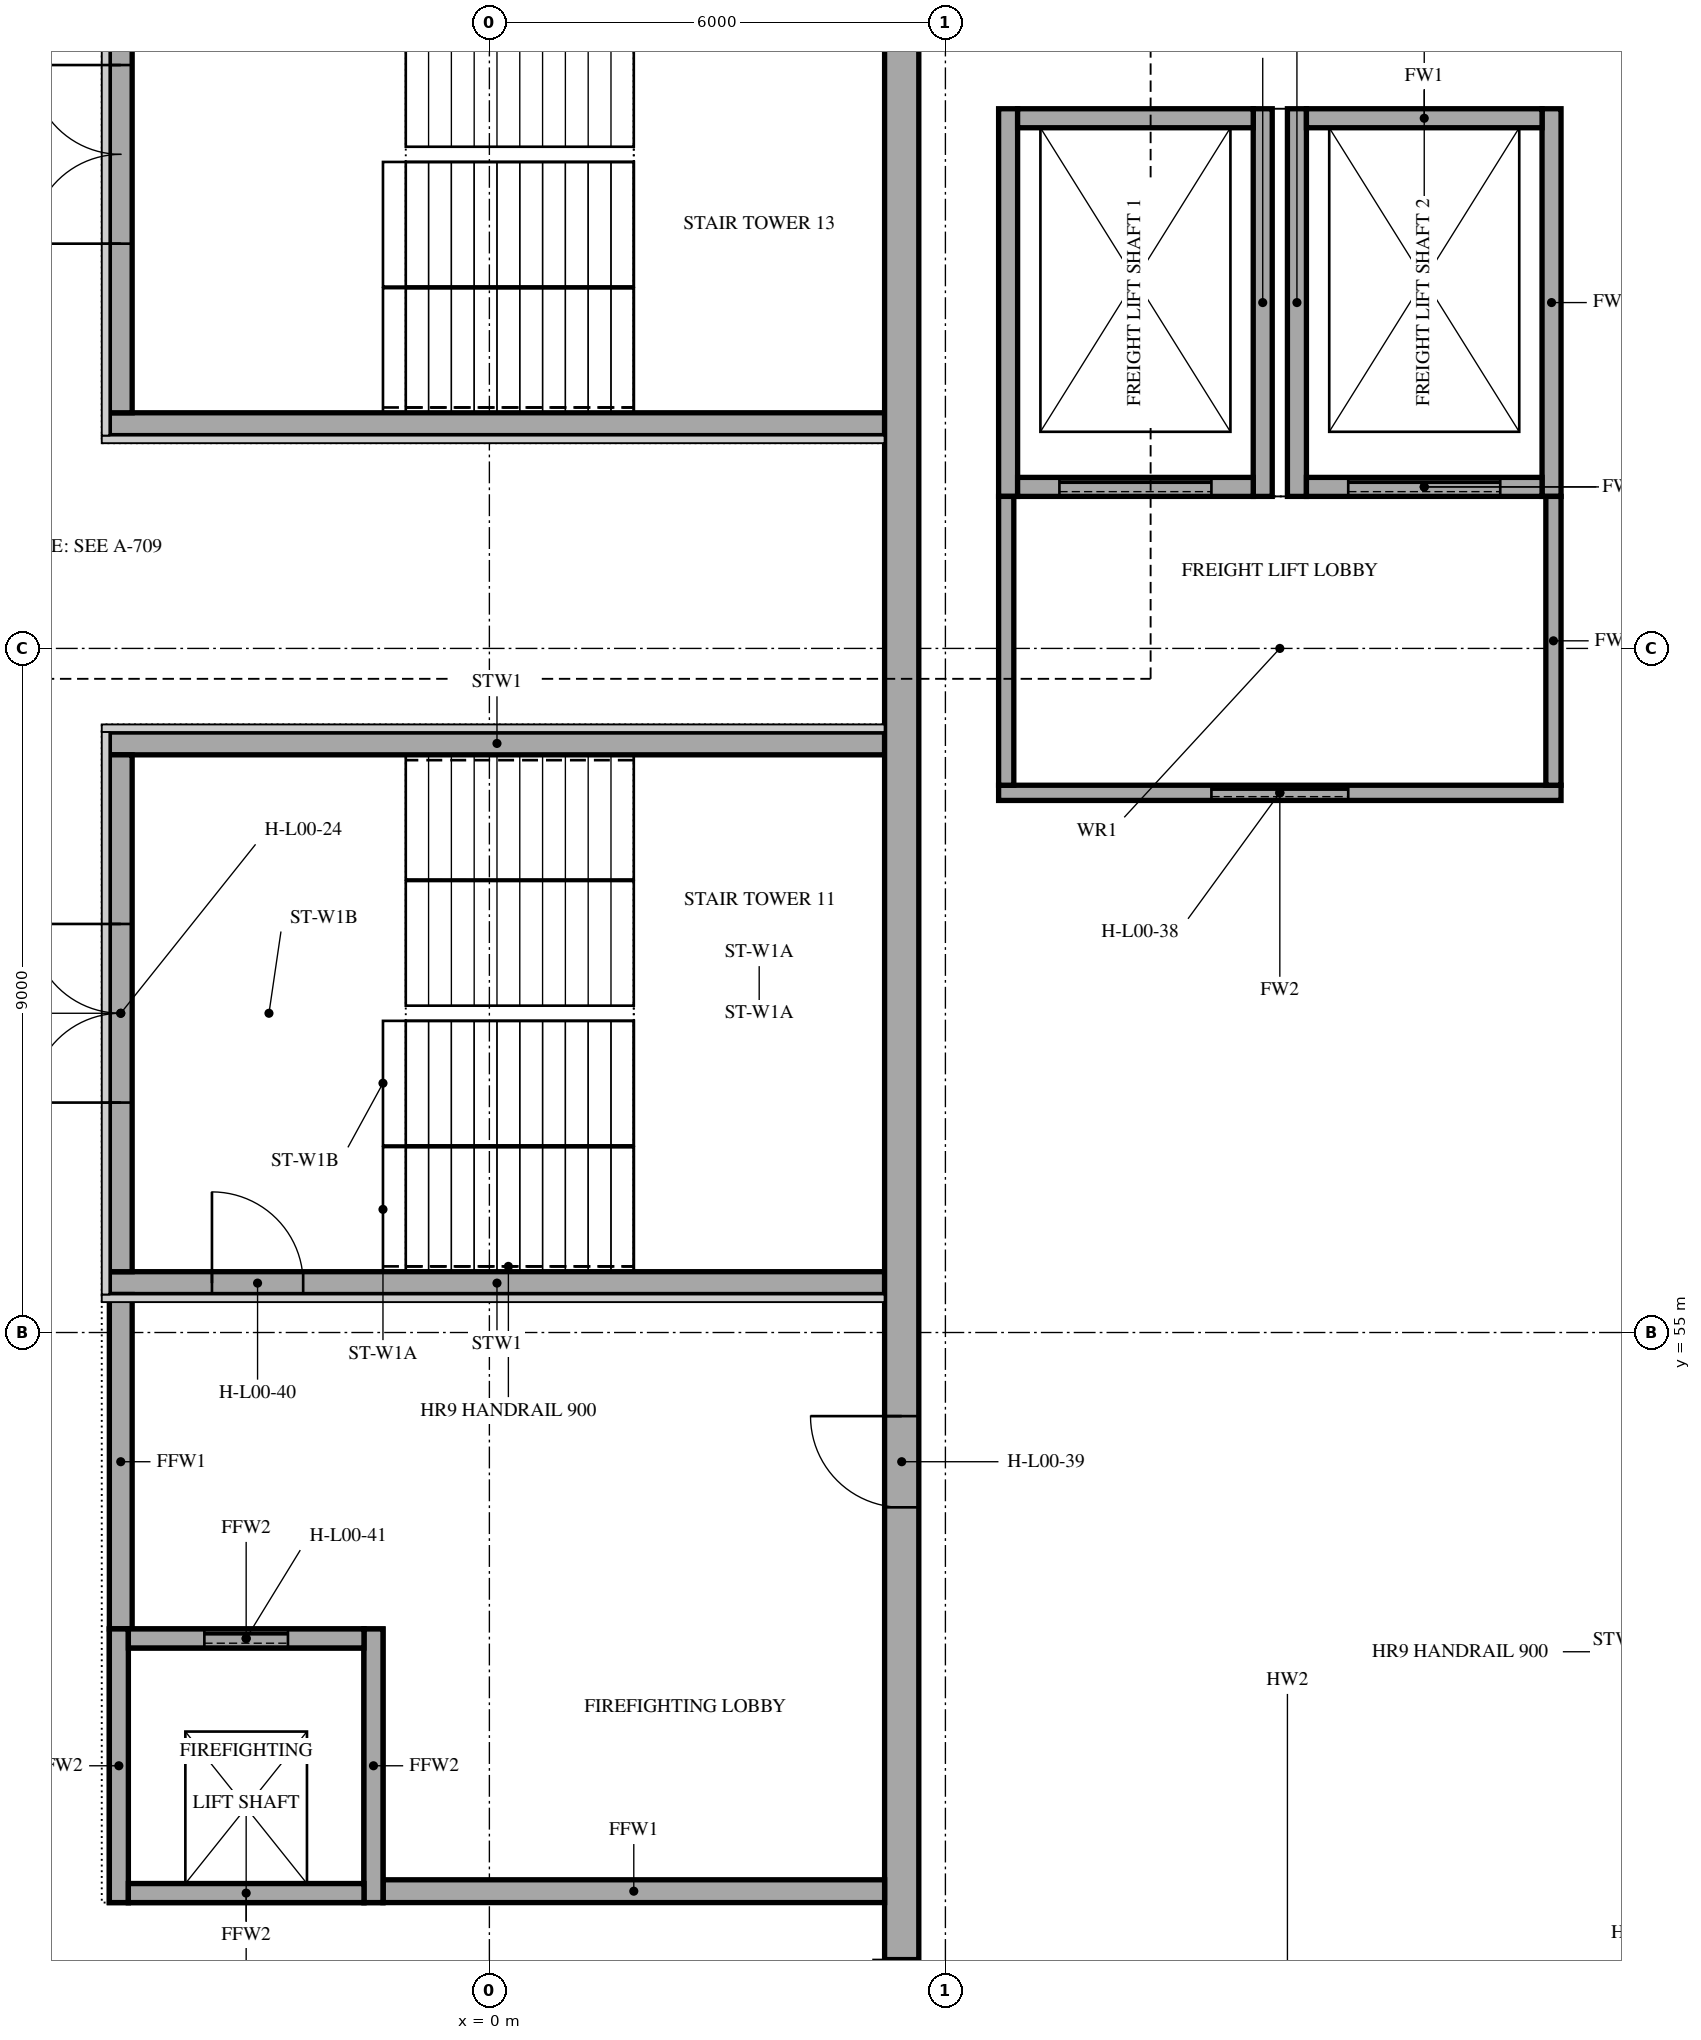
"""IFC4 building model, lengths in metres.
Left out: names, types, materials, properties, quantities, classifications, styles, units other than length and angle.
Written with IfcOpenShell. Run it as: python <this file> out.ifc"""

import sys

from ifc_helpers import new_model, si_unit, direction, frame, frame_2d, origin, place, context, subcontext, project, spatial, rectangle, extrude, element, fill, save


model = new_model("IFC4")
c1 = context("Model", 3, precision=1e-05, world=origin(), true_north=direction((0.0, 1.0)))
c2 = subcontext(c1, "Body", "Model", "MODEL_VIEW")
j1 = project(units=[si_unit("LENGTHUNIT", "METRE"), si_unit("PLANEANGLEUNIT", "RADIAN")], contexts=[c1])
p1 = place(None, origin())
s1 = spatial("IfcSite", under=j1, at=p1, CompositionType="ELEMENT")
p2 = place(p1, origin())
s2 = spatial("IfcBuilding", under=s1, at=p2, CompositionType="ELEMENT")
p3 = place(p2, origin())
s3 = spatial("IfcBuildingStorey", under=s2, at=p3, CompositionType="ELEMENT", Elevation=0.0)
p4 = place(p3, frame((5.2, 55.65, 0.0), z_axis=(0.0, 0.0, 1.0), x_axis=(-1.0, 0.0, 0.0)))
e1 = element("IfcWall", 1, at=p4, inside=s3, PredefinedType="SHEAR", context=c2, shape_type="SweptSolid", body=[
    extrude(rectangle(XDim=10.2, YDim=0.3, at=frame_2d((5.1, 0.0))), origin(), (0.0, 0.0, 1.0), 5.0),
])
p5 = place(p4, frame((7.65, 0.0, 0.0)))
e2 = element("IfcOpeningElement", 2, at=p5, cuts=e1, PredefinedType="OPENING", context=c2, shape_type="SweptSolid", body=[
    extrude(rectangle(XDim=1.2, YDim=2.1, at=frame_2d((0.6, 1.05))), frame((0.0, 0.16, 0.0), z_axis=(0.0, -1.0, 0.0), x_axis=(1.0, 0.0, 0.0)), (0.0, 0.0, 1.0), 0.32),
])
p6 = place(p3, frame((5.2, 62.75, 0.0), z_axis=(0.0, 0.0, 1.0), x_axis=(-1.0, 0.0, 0.0)))
e3 = element("IfcWall", 3, at=p6, inside=s3, PredefinedType="SHEAR", context=c2, shape_type="SweptSolid", body=[
    extrude(rectangle(XDim=10.2, YDim=0.3, at=frame_2d((5.1, 0.0))), origin(), (0.0, 0.0, 1.0), 5.0),
])
p7 = place(p3, frame((-4.85, 55.8, 0.0), z_axis=(0.0, 0.0, 1.0), x_axis=(0.0, 1.0, 0.0)))
e4 = element("IfcWall", 4, at=p7, inside=s3, PredefinedType="SHEAR", context=c2, shape_type="SweptSolid", body=[
    extrude(rectangle(XDim=6.8, YDim=0.3, at=frame_2d((3.4, 0.0))), origin(), (0.0, 0.0, 1.0), 5.0),
])
p8 = place(p7, frame((2.225, 0.0, 0.0)))
e5 = element("IfcOpeningElement", 5, at=p8, cuts=e4, PredefinedType="OPENING", context=c2, shape_type="SweptSolid", body=[
    extrude(rectangle(XDim=2.35, YDim=2.1, at=frame_2d((1.175, 1.05))), frame((0.0, 0.16, 0.0), z_axis=(0.0, -1.0, 0.0), x_axis=(1.0, 0.0, 0.0)), (0.0, 0.0, 1.0), 0.32),
])
p9 = place(p3, frame((5.2, 66.95, 0.0), z_axis=(0.0, 0.0, 1.0), x_axis=(-1.0, 0.0, 0.0)))
e6 = element("IfcWall", 6, at=p9, inside=s3, PredefinedType="SHEAR", context=c2, shape_type="SweptSolid", body=[
    extrude(rectangle(XDim=10.2, YDim=0.3, at=frame_2d((5.1, 0.0))), origin(), (0.0, 0.0, 1.0), 5.0),
])
p10 = place(p3, frame((-4.85, 67.1, 0.0), z_axis=(0.0, 0.0, 1.0), x_axis=(0.0, 1.0, 0.0)))
e7 = element("IfcWall", 7, at=p10, inside=s3, PredefinedType="SHEAR", context=c2, shape_type="SweptSolid", body=[
    extrude(rectangle(XDim=6.8, YDim=0.3, at=frame_2d((3.4, 0.0))), origin(), (0.0, 0.0, 1.0), 5.0),
])
p11 = place(p10, frame((2.225, 0.0, 0.0)))
e8 = element("IfcOpeningElement", 8, at=p11, cuts=e7, PredefinedType="OPENING", context=c2, shape_type="SweptSolid", body=[
    extrude(rectangle(XDim=2.35, YDim=2.1, at=frame_2d((1.175, 1.05))), frame((0.0, 0.16, 0.0), z_axis=(0.0, -1.0, 0.0), x_axis=(1.0, 0.0, 0.0)), (0.0, 0.0, 1.0), 0.32),
])
p12 = place(p3, frame((5.425, 46.75, 0.0), z_axis=(0.0, 0.0, 1.0), x_axis=(0.0, 1.0, 0.0)))
e9 = element("IfcWall", 9, at=p12, inside=s3, PredefinedType="SOLIDWALL", context=c2, shape_type="SweptSolid", body=[
    extrude(rectangle(XDim=61.65, YDim=0.45, at=frame_2d((30.825, 0.0))), origin(), (0.0, 0.0, 1.0), 5.0),
])
p13 = place(p12, frame((5.95, 0.0, 0.0)))
e10 = element("IfcOpeningElement", 10, at=p13, cuts=e9, PredefinedType="OPENING", context=c2, shape_type="SweptSolid", body=[
    extrude(rectangle(XDim=1.2, YDim=2.1, at=frame_2d((0.6, 1.05))), frame((0.0, 0.235, 0.0), z_axis=(0.0, -1.0, 0.0), x_axis=(1.0, 0.0, 0.0)), (0.0, 0.0, 1.0), 0.47),
])
for number, where, z_axis, x_axis in (
    (11, (6.825, 66.0, 0.0), (0.0, 0.0, 1.0), (0.0, 1.0, 0.0)),
    (12, (10.175, 66.0, 0.0), (0.0, 0.0, 1.0), (0.0, 1.0, 0.0)),
):
    element("IfcWall", number, at=place(p3, frame(where, z_axis=z_axis, x_axis=x_axis)), inside=s3, PredefinedType="SHEAR", context=c2, shape_type="SweptSolid", body=[
        extrude(rectangle(XDim=5.1, YDim=0.25, at=frame_2d((2.55, 0.0))), origin(), (0.0, 0.0, 1.0), 5.0),
    ])
p14 = place(p3, frame((6.95, 66.125, 0.0), z_axis=(0.0, 0.0, 1.0), x_axis=(1.0, 0.0, 0.0)))
e13 = element("IfcWall", 13, at=p14, inside=s3, PredefinedType="SHEAR", context=c2, shape_type="SweptSolid", body=[
    extrude(rectangle(XDim=3.1, YDim=0.25, at=frame_2d((1.55, 0.0))), origin(), (0.0, 0.0, 1.0), 5.0),
])
p15 = place(p14, frame((0.55, 0.0, 0.0)))
e14 = element("IfcOpeningElement", 14, at=p15, cuts=e13, PredefinedType="OPENING", context=c2, shape_type="SweptSolid", body=[
    extrude(rectangle(XDim=2.0, YDim=2.4, at=frame_2d((1.0, 1.2))), frame((0.0, 0.135, 0.0), z_axis=(0.0, -1.0, 0.0), x_axis=(1.0, 0.0, 0.0)), (0.0, 0.0, 1.0), 0.27),
])
p16 = place(p3, frame((6.95, 70.975, 0.0), z_axis=(0.0, 0.0, 1.0), x_axis=(1.0, 0.0, 0.0)))
e15 = element("IfcWall", 15, at=p16, inside=s3, PredefinedType="SHEAR", context=c2, shape_type="SweptSolid", body=[
    extrude(rectangle(XDim=3.1, YDim=0.25, at=frame_2d((1.55, 0.0))), origin(), (0.0, 0.0, 1.0), 5.0),
])
for number, where, z_axis, x_axis in (
    (16, (10.625, 66.0, 0.0), (0.0, 0.0, 1.0), (0.0, 1.0, 0.0)),
    (17, (13.975, 66.0, 0.0), (0.0, 0.0, 1.0), (0.0, 1.0, 0.0)),
):
    element("IfcWall", number, at=place(p3, frame(where, z_axis=z_axis, x_axis=x_axis)), inside=s3, PredefinedType="SHEAR", context=c2, shape_type="SweptSolid", body=[
        extrude(rectangle(XDim=5.1, YDim=0.25, at=frame_2d((2.55, 0.0))), origin(), (0.0, 0.0, 1.0), 5.0),
    ])
p17 = place(p3, frame((10.75, 66.125, 0.0), z_axis=(0.0, 0.0, 1.0), x_axis=(1.0, 0.0, 0.0)))
e18 = element("IfcWall", 18, at=p17, inside=s3, PredefinedType="SHEAR", context=c2, shape_type="SweptSolid", body=[
    extrude(rectangle(XDim=3.1, YDim=0.25, at=frame_2d((1.55, 0.0))), origin(), (0.0, 0.0, 1.0), 5.0),
])
p18 = place(p17, frame((0.55, 0.0, 0.0)))
e19 = element("IfcOpeningElement", 19, at=p18, cuts=e18, PredefinedType="OPENING", context=c2, shape_type="SweptSolid", body=[
    extrude(rectangle(XDim=2.0, YDim=2.4, at=frame_2d((1.0, 1.2))), frame((0.0, 0.135, 0.0), z_axis=(0.0, -1.0, 0.0), x_axis=(1.0, 0.0, 0.0)), (0.0, 0.0, 1.0), 0.27),
])
p19 = place(p3, frame((10.75, 70.975, 0.0), z_axis=(0.0, 0.0, 1.0), x_axis=(1.0, 0.0, 0.0)))
e20 = element("IfcWall", 20, at=p19, inside=s3, PredefinedType="SHEAR", context=c2, shape_type="SweptSolid", body=[
    extrude(rectangle(XDim=3.1, YDim=0.25, at=frame_2d((1.55, 0.0))), origin(), (0.0, 0.0, 1.0), 5.0),
])
p20 = place(p3, frame((6.7, 62.1, 0.0), z_axis=(0.0, 0.0, 1.0), x_axis=(1.0, 0.0, 0.0)))
e21 = element("IfcWall", 21, at=p20, inside=s3, PredefinedType="SOLIDWALL", context=c2, shape_type="SweptSolid", body=[
    extrude(rectangle(XDim=7.4, YDim=0.2, at=frame_2d((3.7, 0.0))), origin(), (0.0, 0.0, 1.0), 3.7),
])
p21 = place(p20, frame((2.8, 0.0, 0.0)))
e22 = element("IfcOpeningElement", 22, at=p21, cuts=e21, PredefinedType="OPENING", context=c2, shape_type="SweptSolid", body=[
    extrude(rectangle(XDim=1.8, YDim=2.1, at=frame_2d((0.9, 1.05))), frame((0.0, 0.11, 0.0), z_axis=(0.0, -1.0, 0.0), x_axis=(1.0, 0.0, 0.0)), (0.0, 0.0, 1.0), 0.22),
])
for number, where, z_axis, x_axis in (
    (23, (6.8, 62.2, 0.0), (0.0, 0.0, 1.0), (0.0, 1.0, 0.0)),
    (24, (14.0, 62.2, 0.0), (0.0, 0.0, 1.0), (0.0, 1.0, 0.0)),
):
    element("IfcWall", number, at=place(p3, frame(where, z_axis=z_axis, x_axis=x_axis)), inside=s3, PredefinedType="SOLIDWALL", context=c2, shape_type="SweptSolid", body=[
        extrude(rectangle(XDim=3.8, YDim=0.2, at=frame_2d((1.9, 0.0))), origin(), (0.0, 0.0, 1.0), 3.7),
    ])
p22 = place(p3, frame((-4.85, 51.1, 0.0), z_axis=(0.0, 0.0, 1.0), x_axis=(0.0, 1.0, 0.0)))
e25 = element("IfcWall", 25, at=p22, inside=s3, PredefinedType="SHEAR", context=c2, shape_type="SweptSolid", body=[
    extrude(rectangle(XDim=4.4, YDim=0.3, at=frame_2d((2.2, 0.0))), origin(), (0.0, 0.0, 1.0), 4.75),
])
p23 = place(p3, frame((-1.4, 47.65, 0.0), z_axis=(0.0, 0.0, 1.0), x_axis=(1.0, 0.0, 0.0)))
e26 = element("IfcWall", 26, at=p23, inside=s3, PredefinedType="SHEAR", context=c2, shape_type="SweptSolid", body=[
    extrude(rectangle(XDim=6.6, YDim=0.3, at=frame_2d((3.3, 0.0))), origin(), (0.0, 0.0, 1.0), 4.75),
])
for number, where, z_axis, x_axis in (
    (27, (-4.875, 47.5, 0.0), (0.0, 0.0, 1.0), (0.0, 1.0, 0.0)),
    (28, (-1.525, 47.5, 0.0), (0.0, 0.0, 1.0), (0.0, 1.0, 0.0)),
):
    element("IfcWall", number, at=place(p3, frame(where, z_axis=z_axis, x_axis=x_axis)), inside=s3, PredefinedType="SHEAR", context=c2, shape_type="SweptSolid", body=[
        extrude(rectangle(XDim=3.6, YDim=0.25, at=frame_2d((1.8, 0.0))), origin(), (0.0, 0.0, 1.0), 5.0),
    ])
p24 = place(p3, frame((-4.75, 50.975, 0.0), z_axis=(0.0, 0.0, 1.0), x_axis=(1.0, 0.0, 0.0)))
e29 = element("IfcWall", 29, at=p24, inside=s3, PredefinedType="SHEAR", context=c2, shape_type="SweptSolid", body=[
    extrude(rectangle(XDim=3.1, YDim=0.25, at=frame_2d((1.55, 0.0))), origin(), (0.0, 0.0, 1.0), 5.0),
])
p25 = place(p24, frame((1.0, 0.0, 0.0)))
e30 = element("IfcOpeningElement", 30, at=p25, cuts=e29, PredefinedType="OPENING", context=c2, shape_type="SweptSolid", body=[
    extrude(rectangle(XDim=1.1, YDim=2.1, at=frame_2d((0.55, 1.05))), frame((0.0, 0.135, 0.0), z_axis=(0.0, -1.0, 0.0), x_axis=(1.0, 0.0, 0.0)), (0.0, 0.0, 1.0), 0.27),
])
p26 = place(p3, frame((-4.75, 47.625, 0.0), z_axis=(0.0, 0.0, 1.0), x_axis=(1.0, 0.0, 0.0)))
e31 = element("IfcWall", 31, at=p26, inside=s3, PredefinedType="SHEAR", context=c2, shape_type="SweptSolid", body=[
    extrude(rectangle(XDim=3.1, YDim=0.25, at=frame_2d((1.55, 0.0))), origin(), (0.0, 0.0, 1.0), 5.0),
])
for number, where, z_axis, x_axis in (
    (32, (-4.875, 47.5, -1.4), (0.0, 0.0, 1.0), (0.0, 1.0, 0.0)),
    (33, (-1.525, 47.5, -1.4), (0.0, 0.0, 1.0), (0.0, 1.0, 0.0)),
):
    element("IfcWall", number, at=place(p3, frame(where, z_axis=z_axis, x_axis=x_axis)), inside=s3, PredefinedType="SHEAR", context=c2, shape_type="SweptSolid", body=[
        extrude(rectangle(XDim=3.6, YDim=0.25, at=frame_2d((1.8, 0.0))), origin(), (0.0, 0.0, 1.0), 1.4),
    ])
for number, where, z_axis, x_axis in (
    (34, (-4.75, 50.975, -1.4), (0.0, 0.0, 1.0), (1.0, 0.0, 0.0)),
    (35, (-4.75, 47.625, -1.4), (0.0, 0.0, 1.0), (1.0, 0.0, 0.0)),
):
    element("IfcWall", number, at=place(p3, frame(where, z_axis=z_axis, x_axis=x_axis)), inside=s3, PredefinedType="SHEAR", context=c2, shape_type="SweptSolid", body=[
        extrude(rectangle(XDim=3.1, YDim=0.25, at=frame_2d((1.55, 0.0))), origin(), (0.0, 0.0, 1.0), 1.4),
    ])
p27 = place(p8, origin())
e36 = element("IfcDoor", 36, at=p27, inside=s3, OperationType="DOUBLE_DOOR_SINGLE_SWING", PredefinedType="DOOR", context=c2, shape_type="SweptSolid", body=[
    extrude(rectangle(XDim=2.35, YDim=2.1, at=frame_2d((1.175, 1.05))), frame((0.0, 0.025, 0.0), z_axis=(0.0, -1.0, 0.0), x_axis=(1.0, 0.0, 0.0)), (0.0, 0.0, 1.0), 0.05),
])
fill(e5, e36)
p28 = place(p11, origin())
e37 = element("IfcDoor", 37, at=p28, inside=s3, OperationType="DOUBLE_DOOR_SINGLE_SWING", PredefinedType="DOOR", context=c2, shape_type="SweptSolid", body=[
    extrude(rectangle(XDim=2.35, YDim=2.1, at=frame_2d((1.175, 1.05))), frame((0.0, 0.025, 0.0), z_axis=(0.0, -1.0, 0.0), x_axis=(1.0, 0.0, 0.0)), (0.0, 0.0, 1.0), 0.05),
])
fill(e8, e37)
p29 = place(p15, origin())
e38 = element("IfcDoor", 38, at=p29, inside=s3, OperationType="SLIDING_TO_LEFT", PredefinedType="DOOR", context=c2, shape_type="SweptSolid", body=[
    extrude(rectangle(XDim=2.0, YDim=2.4, at=frame_2d((1.0, 1.2))), frame((0.0, 0.025, 0.0), z_axis=(0.0, -1.0, 0.0), x_axis=(1.0, 0.0, 0.0)), (0.0, 0.0, 1.0), 0.05),
])
fill(e14, e38)
p30 = place(p18, origin())
e39 = element("IfcDoor", 39, at=p30, inside=s3, OperationType="SLIDING_TO_LEFT", PredefinedType="DOOR", context=c2, shape_type="SweptSolid", body=[
    extrude(rectangle(XDim=2.0, YDim=2.4, at=frame_2d((1.0, 1.2))), frame((0.0, 0.025, 0.0), z_axis=(0.0, -1.0, 0.0), x_axis=(1.0, 0.0, 0.0)), (0.0, 0.0, 1.0), 0.05),
])
fill(e19, e39)
p31 = place(p21, origin())
e40 = element("IfcDoor", 40, at=p31, inside=s3, OperationType="DOUBLE_DOOR_SINGLE_SWING", PredefinedType="DOOR", context=c2, shape_type="SweptSolid", body=[
    extrude(rectangle(XDim=1.8, YDim=2.1, at=frame_2d((0.9, 1.05))), frame((0.0, 0.025, 0.0), z_axis=(0.0, -1.0, 0.0), x_axis=(1.0, 0.0, 0.0)), (0.0, 0.0, 1.0), 0.05),
])
fill(e22, e40)
p32 = place(p13, origin())
e41 = element("IfcDoor", 41, at=p32, inside=s3, OperationType="SINGLE_SWING_RIGHT", PredefinedType="DOOR", context=c2, shape_type="SweptSolid", body=[
    extrude(rectangle(XDim=1.2, YDim=2.1, at=frame_2d((0.6, 1.05))), frame((0.0, 0.025, 0.0), z_axis=(0.0, -1.0, 0.0), x_axis=(1.0, 0.0, 0.0)), (0.0, 0.0, 1.0), 0.05),
])
fill(e10, e41)
p33 = place(p5, frame((1.2, 0.0, 0.0), z_axis=(0.0, 0.0, 1.0), x_axis=(-1.0, 0.0, 0.0)))
e42 = element("IfcDoor", 42, at=p33, inside=s3, OperationType="SINGLE_SWING_LEFT", PredefinedType="DOOR", context=c2, shape_type="SweptSolid", body=[
    extrude(rectangle(XDim=1.2, YDim=2.1, at=frame_2d((0.6, 1.05))), frame((0.0, 0.025, 0.0), z_axis=(0.0, -1.0, 0.0), x_axis=(1.0, 0.0, 0.0)), (0.0, 0.0, 1.0), 0.05),
])
fill(e2, e42)
p34 = place(p25, origin())
e43 = element("IfcDoor", 43, at=p34, inside=s3, OperationType="SLIDING_TO_LEFT", PredefinedType="DOOR", context=c2, shape_type="SweptSolid", body=[
    extrude(rectangle(XDim=1.1, YDim=2.1, at=frame_2d((0.55, 1.05))), frame((0.0, 0.025, 0.0), z_axis=(0.0, -1.0, 0.0), x_axis=(1.0, 0.0, 0.0)), (0.0, 0.0, 1.0), 0.05),
])
fill(e30, e43)
save(model, sys.argv[1])
